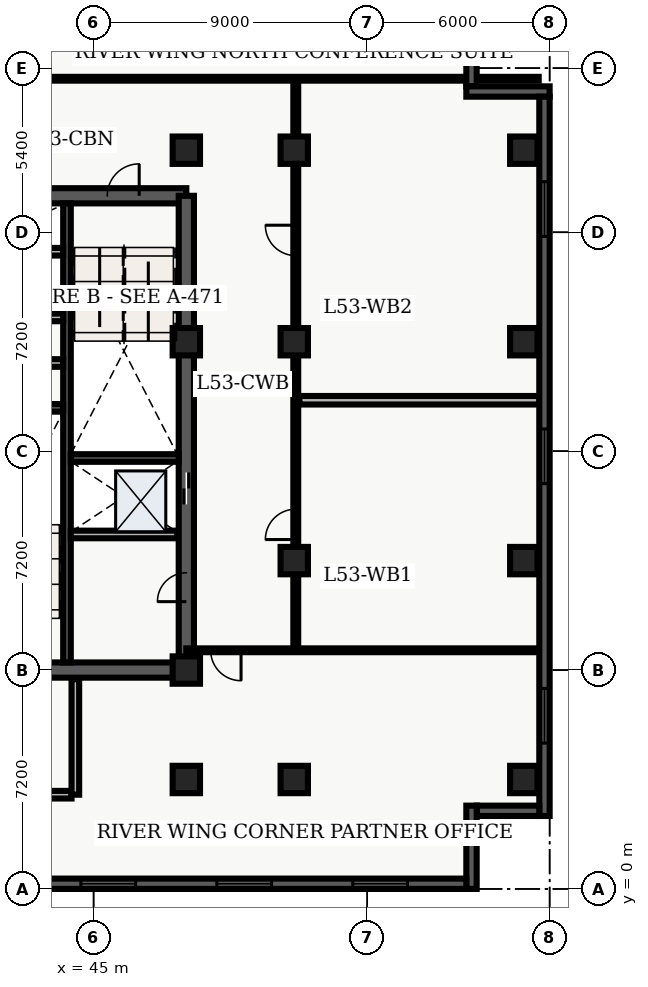
"""IFC4 building model, lengths in metres.
Left out: names, types, materials, properties, quantities, classifications, styles, units other than length and angle.
Written with IfcOpenShell. Run it as: python <this file> out.ifc"""

import sys

from ifc_helpers import new_model, entity, si_unit, converted_unit, direction, frame, origin_with_axes, origin_2d_with_axis, place, context, subcontext, project, spatial, polyline, rectangle, outline, extrude, element, fill, save


model = new_model("IFC4")
c1 = context("Model", 3, precision=1e-05, world=origin_with_axes(), true_north=direction((0.0, 1.0)))
c2 = subcontext(c1, "Body", "Model", "MODEL_VIEW")
j1 = project(units=[si_unit("LENGTHUNIT", "METRE"), converted_unit("PLANEANGLEUNIT", "DEGREE", entity("IfcPlaneAngleMeasure", 0.017), si_unit("PLANEANGLEUNIT", "RADIAN"), dimensions=[0, 0, 0, 0, 0, 0, 0])], contexts=[c1])
p1 = place(None, origin_with_axes())
s1 = spatial("IfcSite", under=j1, at=p1, CompositionType="ELEMENT")
p2 = place(p1, origin_with_axes())
s2 = spatial("IfcBuilding", under=s1, at=p2, CompositionType="ELEMENT")
p3 = place(p2, frame((0.0, 0.0, 216.0), z_axis=(0.0, 0.0, 1.0), x_axis=(1.0, 0.0, 0.0)))
s3 = spatial("IfcBuildingStorey", under=s2, at=p3, CompositionType="ELEMENT", Elevation=216.0)
p4 = place(p3, frame((40.2, 7.2, 0.0), z_axis=(0.0, 0.0, 1.0), x_axis=(1.0, 0.0, 0.0)))
e1 = element("IfcWall", 1, at=p4, inside=s3, PredefinedType="SHEAR", context=c2, shape_type="SweptSolid", body=[
    extrude(outline(polyline([(0.0, -0.25), (7.85, -0.25), (7.85, 0.25), (0.0, 0.25), (0.0, -0.25)])), origin_with_axes(), (0.0, 0.0, 1.0), 3.6),
])
p5 = place(p4, frame((2.175, 0.0, 0.0), z_axis=(0.0, 0.0, 1.0), x_axis=(1.0, 0.0, 0.0)))
e2 = element("IfcOpeningElement", 2, at=p5, cuts=e1, PredefinedType="OPENING", context=c2, shape_type="SweptSolid", body=[
    extrude(rectangle(XDim=1.05, YDim=0.52, at=origin_2d_with_axis()), origin_with_axes(), (0.0, 0.0, 1.0), 2.15),
])
p6 = place(p3, frame((40.2, 22.8, 0.0), z_axis=(0.0, 0.0, 1.0), x_axis=(1.0, 0.0, 0.0)))
e3 = element("IfcWall", 3, at=p6, inside=s3, PredefinedType="SHEAR", context=c2, shape_type="SweptSolid", body=[
    extrude(outline(polyline([(0.0, -0.25), (7.85, -0.25), (7.85, 0.25), (0.0, 0.25), (0.0, -0.25)])), origin_with_axes(), (0.0, 0.0, 1.0), 3.6),
])
p7 = place(p6, frame((5.775, 0.0, 0.0), z_axis=(0.0, 0.0, 1.0), x_axis=(1.0, 0.0, 0.0)))
e4 = element("IfcOpeningElement", 4, at=p7, cuts=e3, PredefinedType="OPENING", context=c2, shape_type="SweptSolid", body=[
    extrude(rectangle(XDim=1.05, YDim=0.52, at=origin_2d_with_axis()), origin_with_axes(), (0.0, 0.0, 1.0), 2.15),
])
p8 = place(p3, frame((48.05, 7.2, 0.0), z_axis=(0.0, 0.0, 1.0), x_axis=(0.0, 1.0, 0.0)))
e5 = element("IfcWall", 5, at=p8, inside=s3, PredefinedType="SHEAR", context=c2, shape_type="SweptSolid", body=[
    extrude(outline(polyline([(0.0, -0.25), (15.6, -0.25), (15.6, 0.25), (0.0, 0.25), (0.0, -0.25)])), origin_with_axes(), (0.0, 0.0, 1.0), 3.6),
])
p9 = place(p8, frame((5.975, 0.0, 0.0), z_axis=(0.0, 0.0, 1.0), x_axis=(1.0, 0.0, 0.0)))
e6 = element("IfcOpeningElement", 6, at=p9, cuts=e5, PredefinedType="OPENING", context=c2, shape_type="SweptSolid", body=[
    extrude(rectangle(XDim=1.05, YDim=0.52, at=origin_2d_with_axis()), origin_with_axes(), (0.0, 0.0, 1.0), 2.15),
])
p10 = place(p8, frame((2.725, 0.0, 0.0), z_axis=(0.0, 0.0, 1.0), x_axis=(1.0, 0.0, 0.0)))
e7 = element("IfcOpeningElement", 7, at=p10, cuts=e5, PredefinedType="OPENING", context=c2, shape_type="SweptSolid", body=[
    extrude(rectangle(XDim=0.95, YDim=0.52, at=origin_2d_with_axis()), origin_with_axes(), (0.0, 0.0, 1.0), 2.15),
])
p11 = place(p3, frame((44.125, 7.45, 0.0), z_axis=(0.0, 0.0, 1.0), x_axis=(0.0, 1.0, 0.0)))
e8 = element("IfcWall", 8, at=p11, inside=s3, PredefinedType="SHEAR", context=c2, shape_type="SweptSolid", body=[
    extrude(outline(polyline([(0.0, -0.125), (15.1, -0.125), (15.1, 0.125), (0.0, 0.125), (0.0, -0.125)])), origin_with_axes(), (0.0, 0.0, 1.0), 3.6),
])
for number, where, z_axis, x_axis in (
    (9, (40.45, 15.825, 0.0), (0.0, 0.0, 1.0), (1.0, 0.0, 0.0)),
    (10, (44.25, 14.175, 0.0), (0.0, 0.0, 1.0), (1.0, 0.0, 0.0)),
):
    element("IfcWall", number, at=place(p3, frame(where, z_axis=z_axis, x_axis=x_axis)), inside=s3, PredefinedType="SHEAR", context=c2, shape_type="SweptSolid", body=[
        extrude(outline(polyline([(0.0, -0.125), (3.55, -0.125), (3.55, 0.125), (0.0, 0.125), (0.0, -0.125)])), origin_with_axes(), (0.0, 0.0, 1.0), 3.6),
    ])
p12 = place(p3, frame((40.5, 17.3, 0.0), z_axis=(0.0, 0.0, 1.0), x_axis=(1.0, 0.0, 0.0)))
e11 = element("IfcWall", 11, at=p12, inside=s3, PredefinedType="SOLIDWALL", context=c2, shape_type="SweptSolid", body=[
    extrude(outline(polyline([(0.0, -0.125), (3.5, -0.125), (3.5, 0.125), (0.0, 0.125), (0.0, -0.125)])), origin_with_axes(), (0.0, 0.0, 1.0), 2.64),
])
p13 = place(p12, frame((2.4, 0.0, 0.0), z_axis=(0.0, 0.0, 1.0), x_axis=(1.0, 0.0, 0.0)))
e12 = element("IfcOpeningElement", 12, at=p13, cuts=e11, PredefinedType="OPENING", context=c2, shape_type="SweptSolid", body=[
    extrude(rectangle(XDim=0.9, YDim=0.27, at=origin_2d_with_axis()), origin_with_axes(), (0.0, 0.0, 1.0), 2.15),
])
p14 = place(p3, frame((40.5, 18.8, 0.0), z_axis=(0.0, 0.0, 1.0), x_axis=(1.0, 0.0, 0.0)))
e13 = element("IfcWall", 13, at=p14, inside=s3, PredefinedType="SOLIDWALL", context=c2, shape_type="SweptSolid", body=[
    extrude(outline(polyline([(0.0, -0.125), (3.5, -0.125), (3.5, 0.125), (0.0, 0.125), (0.0, -0.125)])), origin_with_axes(), (0.0, 0.0, 1.0), 2.64),
])
p15 = place(p3, frame((40.325, 3.1, 0.0), z_axis=(0.0, 0.0, 1.0), x_axis=(1.0, 0.0, 0.0)))
e14 = element("IfcWall", 14, at=p15, inside=s3, PredefinedType="SOLIDWALL", context=c2, shape_type="SweptSolid", body=[
    extrude(outline(polyline([(0.0, -0.125), (3.95, -0.125), (3.95, 0.125), (0.0, 0.125), (0.0, -0.125)])), origin_with_axes(), (0.0, 0.0, 1.0), 2.64),
])
p16 = place(p3, frame((44.4, 3.1, 0.0), z_axis=(0.0, 0.0, 1.0), x_axis=(0.0, 1.0, 0.0)))
e15 = element("IfcWall", 15, at=p16, inside=s3, PredefinedType="SOLIDWALL", context=c2, shape_type="SweptSolid", body=[
    extrude(outline(polyline([(0.0, -0.125), (3.8, -0.125), (3.8, 0.125), (0.0, 0.125), (0.0, -0.125)])), origin_with_axes(), (0.0, 0.0, 1.0), 2.64),
])
for number, where, z_axis, x_axis in (
    (16, (48.05, 3.6, 0.0), (0.0, 0.0, 1.0), (1.0, 0.0, 0.0)),
    (17, (48.05, 7.2, 0.0), (0.0, 0.0, 1.0), (1.0, 0.0, 0.0)),
    (18, (48.05, 18.0, 0.0), (0.0, 0.0, 1.0), (1.0, 0.0, 0.0)),
    (19, (48.05, 24.3, 0.0), (0.0, 0.0, 1.0), (1.0, 0.0, 0.0)),
    (20, (51.6, 3.6, 0.0), (0.0, 0.0, 1.0), (1.0, 0.0, 0.0)),
    (21, (51.6, 10.8, 0.0), (0.0, 0.0, 1.0), (1.0, 0.0, 0.0)),
    (22, (51.6, 18.0, 0.0), (0.0, 0.0, 1.0), (1.0, 0.0, 0.0)),
    (23, (51.6, 24.3, 0.0), (0.0, 0.0, 1.0), (1.0, 0.0, 0.0)),
    (24, (59.15, 3.6, 0.0), (0.0, 0.0, 1.0), (1.0, 0.0, 0.0)),
    (25, (59.15, 10.8, 0.0), (0.0, 0.0, 1.0), (1.0, 0.0, 0.0)),
    (26, (59.15, 18.0, 0.0), (0.0, 0.0, 1.0), (1.0, 0.0, 0.0)),
    (27, (59.15, 24.3, 0.0), (0.0, 0.0, 1.0), (1.0, 0.0, 0.0)),
):
    element("IfcColumn", number, at=place(p3, frame(where, z_axis=z_axis, x_axis=x_axis)), inside=s3, PredefinedType="COLUMN", context=c2, shape_type="SweptSolid", body=[
        extrude(rectangle(XDim=0.9, YDim=0.9, at=origin_2d_with_axis()), origin_with_axes(), (0.0, 0.0, 1.0), 3.9),
    ])
for number, where, z_axis, x_axis in (
    (28, (40.5, 20.96, 0.0), (0.0, 0.0, 1.0), (1.0, 0.0, 0.0)),
    (29, (44.25, 11.66, 0.0), (0.0, 0.0, 1.0), (1.0, 0.0, 0.0)),
):
    element("IfcWall", number, at=place(p3, frame(where, z_axis=z_axis, x_axis=x_axis)), inside=s3, PredefinedType="SOLIDWALL", context=c2, shape_type="SweptSolid", body=[
        extrude(outline(polyline([(0.0, -0.125), (3.5, -0.125), (3.5, 0.125), (0.0, 0.125), (0.0, -0.125)])), origin_with_axes(), (0.0, 0.0, 1.0), 2.64),
    ])
p17 = place(p3, frame((51.65, 7.85, 0.0), z_axis=(0.0, 0.0, 1.0), x_axis=(0.0, 1.0, 0.0)))
e30 = element("IfcWall", 30, at=p17, inside=s3, PredefinedType="PARTITIONING", context=c2, shape_type="SweptSolid", body=[
    extrude(outline(polyline([(0.0, -0.08), (18.8, -0.08), (18.8, 0.08), (0.0, 0.08), (0.0, -0.08)])), origin_with_axes(), (0.0, 0.0, 1.0), 2.64),
])
p18 = place(p17, frame((4.143, 0.0, 0.0), z_axis=(0.0, 0.0, 1.0), x_axis=(1.0, 0.0, 0.0)))
e31 = element("IfcOpeningElement", 31, at=p18, cuts=e30, PredefinedType="OPENING", context=c2, shape_type="SweptSolid", body=[
    extrude(rectangle(XDim=1.0, YDim=0.18, at=origin_2d_with_axis()), origin_with_axes(), (0.0, 0.0, 1.0), 2.15),
])
p19 = place(p17, frame((13.482, 0.0, 0.0), z_axis=(0.0, 0.0, 1.0), x_axis=(1.0, 0.0, 0.0)))
e32 = element("IfcOpeningElement", 32, at=p19, cuts=e30, PredefinedType="OPENING", context=c2, shape_type="SweptSolid", body=[
    extrude(rectangle(XDim=1.0, YDim=0.18, at=origin_2d_with_axis()), origin_with_axes(), (0.0, 0.0, 1.0), 2.15),
])
p20 = place(p3, frame((59.665, 7.85, 0.0), z_axis=(0.0, 0.0, 1.0), x_axis=(-1.0, 0.0, 0.0)))
e33 = element("IfcWall", 33, at=p20, inside=s3, PredefinedType="PARTITIONING", context=c2, shape_type="SweptSolid", body=[
    extrude(outline(polyline([(0.0, -0.062), (11.615, -0.062), (11.615, 0.062), (0.0, 0.062), (0.0, -0.062)])), origin_with_axes(), (0.0, 0.0, 1.0), 2.64),
])
p21 = place(p20, frame((10.315, 0.0, 0.0), z_axis=(0.0, 0.0, 1.0), x_axis=(1.0, 0.0, 0.0)))
e34 = element("IfcOpeningElement", 34, at=p21, cuts=e33, PredefinedType="OPENING", context=c2, shape_type="SweptSolid", body=[
    extrude(rectangle(XDim=1.0, YDim=0.145, at=origin_2d_with_axis()), origin_with_axes(), (0.0, 0.0, 1.0), 2.15),
])
p22 = place(p3, frame((38.735, 26.65, 0.0), z_axis=(0.0, 0.0, 1.0), x_axis=(1.0, 0.0, 0.0)))
e35 = element("IfcWall", 35, at=p22, inside=s3, PredefinedType="PARTITIONING", context=c2, shape_type="SweptSolid", body=[
    extrude(outline(polyline([(0.0, -0.062), (20.905, -0.062), (20.905, 0.062), (0.0, 0.062), (0.0, -0.062)])), origin_with_axes(), (0.0, 0.0, 1.0), 2.64),
])
p23 = place(p22, frame((4.265, 0.0, 0.0), z_axis=(0.0, 0.0, 1.0), x_axis=(1.0, 0.0, 0.0)))
e36 = element("IfcOpeningElement", 36, at=p23, cuts=e35, PredefinedType="OPENING", context=c2, shape_type="SweptSolid", body=[
    extrude(rectangle(XDim=1.0, YDim=0.145, at=origin_2d_with_axis()), origin_with_axes(), (0.0, 0.0, 1.0), 2.15),
])
p24 = place(p3, frame((51.77, 16.075, 0.0), z_axis=(0.0, 0.0, 1.0), x_axis=(1.0, 0.0, 0.0)))
e37 = element("IfcWall", 37, at=p24, inside=s3, PredefinedType="PARTITIONING", context=c2, shape_type="SweptSolid", body=[
    extrude(outline(polyline([(0.0, -0.14), (7.895, -0.14), (7.895, 0.14), (0.0, 0.14), (0.0, -0.14)])), origin_with_axes(), (0.0, 0.0, 1.0), 2.64),
])
p25 = place(p3, frame((57.43, 28.46, 0.0), z_axis=(0.0, 0.0, 1.0), x_axis=(0.0, -1.0, 0.0)))
e38 = element("IfcWall", 38, at=p25, inside=s3, PredefinedType="SOLIDWALL", context=c2, shape_type="SweptSolid", body=[
    extrude(outline(polyline([(0.0, -0.17), (2.06, -0.17), (2.06, 0.17), (0.0, 0.17), (0.0, -0.17)])), origin_with_axes(), (0.0, 0.0, 1.0), 3.6),
])
p26 = place(p3, frame((57.26, 26.23, 0.0), z_axis=(0.0, 0.0, 1.0), x_axis=(1.0, 0.0, 0.0)))
e39 = element("IfcWall", 39, at=p26, inside=s3, PredefinedType="SOLIDWALL", context=c2, shape_type="SweptSolid", body=[
    extrude(outline(polyline([(0.0, -0.17), (2.74, -0.17), (2.74, 0.17), (0.0, 0.17), (0.0, -0.17)])), origin_with_axes(), (0.0, 0.0, 1.0), 3.6),
])
p27 = place(p3, frame((59.83, 26.06, 0.0), z_axis=(0.0, 0.0, 1.0), x_axis=(0.0, -1.0, 0.0)))
e40 = element("IfcWall", 40, at=p27, inside=s3, PredefinedType="SOLIDWALL", context=c2, shape_type="SweptSolid", body=[
    extrude(outline(polyline([(0.0, -0.17), (23.66, -0.17), (23.66, 0.17), (0.0, 0.17), (0.0, -0.17)])), origin_with_axes(), (0.0, 0.0, 1.0), 3.6),
])
p28 = place(p27, frame((3.696, 0.0, 0.45), z_axis=(0.0, 0.0, 1.0), x_axis=(1.0, 0.0, 0.0)))
e41 = element("IfcOpeningElement", 41, at=p28, cuts=e40, PredefinedType="OPENING", context=c2, shape_type="SweptSolid", body=[
    extrude(rectangle(XDim=1.8, YDim=0.36, at=origin_2d_with_axis()), origin_with_axes(), (0.0, 0.0, 1.0), 2.1),
])
p29 = place(p27, frame((11.83, 0.0, 0.45), z_axis=(0.0, 0.0, 1.0), x_axis=(1.0, 0.0, 0.0)))
e42 = element("IfcOpeningElement", 42, at=p29, cuts=e40, PredefinedType="OPENING", context=c2, shape_type="SweptSolid", body=[
    extrude(rectangle(XDim=1.8, YDim=0.36, at=origin_2d_with_axis()), origin_with_axes(), (0.0, 0.0, 1.0), 2.1),
])
p30 = place(p27, frame((20.364, 0.0, 0.45), z_axis=(0.0, 0.0, 1.0), x_axis=(1.0, 0.0, 0.0)))
e43 = element("IfcOpeningElement", 43, at=p30, cuts=e40, PredefinedType="OPENING", context=c2, shape_type="SweptSolid", body=[
    extrude(rectangle(XDim=1.8, YDim=0.36, at=origin_2d_with_axis()), origin_with_axes(), (0.0, 0.0, 1.0), 2.1),
])
p31 = place(p3, frame((59.66, 2.57, 0.0), z_axis=(0.0, 0.0, 1.0), x_axis=(-1.0, 0.0, 0.0)))
e44 = element("IfcWall", 44, at=p31, inside=s3, PredefinedType="SOLIDWALL", context=c2, shape_type="SweptSolid", body=[
    extrude(outline(polyline([(0.0, -0.17), (2.06, -0.17), (2.06, 0.17), (0.0, 0.17), (0.0, -0.17)])), origin_with_axes(), (0.0, 0.0, 1.0), 3.6),
])
p32 = place(p3, frame((57.43, 2.74, 0.0), z_axis=(0.0, 0.0, 1.0), x_axis=(0.0, -1.0, 0.0)))
e45 = element("IfcWall", 45, at=p32, inside=s3, PredefinedType="SOLIDWALL", context=c2, shape_type="SweptSolid", body=[
    extrude(outline(polyline([(0.0, -0.17), (2.74, -0.17), (2.74, 0.17), (0.0, 0.17), (0.0, -0.17)])), origin_with_axes(), (0.0, 0.0, 1.0), 3.6),
])
p33 = place(p3, frame((57.26, 0.17, 0.0), z_axis=(0.0, 0.0, 1.0), x_axis=(-1.0, 0.0, 0.0)))
e46 = element("IfcWall", 46, at=p33, inside=s3, PredefinedType="SOLIDWALL", context=c2, shape_type="SweptSolid", body=[
    extrude(outline(polyline([(0.0, -0.17), (54.86, -0.17), (54.86, 0.17), (0.0, 0.17), (0.0, -0.17)])), origin_with_axes(), (0.0, 0.0, 1.0), 3.6),
])
p34 = place(p33, frame((2.836, 0.0, 0.45), z_axis=(0.0, 0.0, 1.0), x_axis=(1.0, 0.0, 0.0)))
e47 = element("IfcOpeningElement", 47, at=p34, cuts=e46, PredefinedType="OPENING", context=c2, shape_type="SweptSolid", body=[
    extrude(rectangle(XDim=1.8, YDim=0.36, at=origin_2d_with_axis()), origin_with_axes(), (0.0, 0.0, 1.0), 2.1),
])
p35 = place(p33, frame((7.307, 0.0, 0.45), z_axis=(0.0, 0.0, 1.0), x_axis=(1.0, 0.0, 0.0)))
e48 = element("IfcOpeningElement", 48, at=p35, cuts=e46, PredefinedType="OPENING", context=c2, shape_type="SweptSolid", body=[
    extrude(rectangle(XDim=1.8, YDim=0.36, at=origin_2d_with_axis()), origin_with_axes(), (0.0, 0.0, 1.0), 2.1),
])
p36 = place(p33, frame((11.779, 0.0, 0.45), z_axis=(0.0, 0.0, 1.0), x_axis=(1.0, 0.0, 0.0)))
e49 = element("IfcOpeningElement", 49, at=p36, cuts=e46, PredefinedType="OPENING", context=c2, shape_type="SweptSolid", body=[
    extrude(rectangle(XDim=1.8, YDim=0.36, at=origin_2d_with_axis()), origin_with_axes(), (0.0, 0.0, 1.0), 2.1),
])
p37 = place(p33, frame((16.251, 0.0, 0.45), z_axis=(0.0, 0.0, 1.0), x_axis=(1.0, 0.0, 0.0)))
e50 = element("IfcOpeningElement", 50, at=p37, cuts=e46, PredefinedType="OPENING", context=c2, shape_type="SweptSolid", body=[
    extrude(rectangle(XDim=1.8, YDim=0.36, at=origin_2d_with_axis()), origin_with_axes(), (0.0, 0.0, 1.0), 2.1),
])
p38 = place(p33, frame((20.723, 0.0, 0.45), z_axis=(0.0, 0.0, 1.0), x_axis=(1.0, 0.0, 0.0)))
e51 = element("IfcOpeningElement", 51, at=p38, cuts=e46, PredefinedType="OPENING", context=c2, shape_type="SweptSolid", body=[
    extrude(rectangle(XDim=1.8, YDim=0.36, at=origin_2d_with_axis()), origin_with_axes(), (0.0, 0.0, 1.0), 2.1),
])
p39 = place(p33, frame((25.194, 0.0, 0.45), z_axis=(0.0, 0.0, 1.0), x_axis=(1.0, 0.0, 0.0)))
e52 = element("IfcOpeningElement", 52, at=p39, cuts=e46, PredefinedType="OPENING", context=c2, shape_type="SweptSolid", body=[
    extrude(rectangle(XDim=1.8, YDim=0.36, at=origin_2d_with_axis()), origin_with_axes(), (0.0, 0.0, 1.0), 2.1),
])
p40 = place(p33, frame((29.666, 0.0, 0.45), z_axis=(0.0, 0.0, 1.0), x_axis=(1.0, 0.0, 0.0)))
e53 = element("IfcOpeningElement", 53, at=p40, cuts=e46, PredefinedType="OPENING", context=c2, shape_type="SweptSolid", body=[
    extrude(rectangle(XDim=1.8, YDim=0.36, at=origin_2d_with_axis()), origin_with_axes(), (0.0, 0.0, 1.0), 2.1),
])
p41 = place(p33, frame((34.138, 0.0, 0.45), z_axis=(0.0, 0.0, 1.0), x_axis=(1.0, 0.0, 0.0)))
e54 = element("IfcOpeningElement", 54, at=p41, cuts=e46, PredefinedType="OPENING", context=c2, shape_type="SweptSolid", body=[
    extrude(rectangle(XDim=1.8, YDim=0.36, at=origin_2d_with_axis()), origin_with_axes(), (0.0, 0.0, 1.0), 2.1),
])
p42 = place(p33, frame((38.159, 0.0, 0.45), z_axis=(0.0, 0.0, 1.0), x_axis=(1.0, 0.0, 0.0)))
e55 = element("IfcOpeningElement", 55, at=p42, cuts=e46, PredefinedType="OPENING", context=c2, shape_type="SweptSolid", body=[
    extrude(rectangle(XDim=1.8, YDim=0.36, at=origin_2d_with_axis()), origin_with_axes(), (0.0, 0.0, 1.0), 2.1),
])
p43 = place(p33, frame((43.081, 0.0, 0.45), z_axis=(0.0, 0.0, 1.0), x_axis=(1.0, 0.0, 0.0)))
e56 = element("IfcOpeningElement", 56, at=p43, cuts=e46, PredefinedType="OPENING", context=c2, shape_type="SweptSolid", body=[
    extrude(rectangle(XDim=1.8, YDim=0.36, at=origin_2d_with_axis()), origin_with_axes(), (0.0, 0.0, 1.0), 2.1),
])
p44 = place(p33, frame((47.553, 0.0, 0.45), z_axis=(0.0, 0.0, 1.0), x_axis=(1.0, 0.0, 0.0)))
e57 = element("IfcOpeningElement", 57, at=p44, cuts=e46, PredefinedType="OPENING", context=c2, shape_type="SweptSolid", body=[
    extrude(rectangle(XDim=1.8, YDim=0.36, at=origin_2d_with_axis()), origin_with_axes(), (0.0, 0.0, 1.0), 2.1),
])
p45 = place(p33, frame((52.024, 0.0, 0.45), z_axis=(0.0, 0.0, 1.0), x_axis=(1.0, 0.0, 0.0)))
e58 = element("IfcOpeningElement", 58, at=p45, cuts=e46, PredefinedType="OPENING", context=c2, shape_type="SweptSolid", body=[
    extrude(rectangle(XDim=1.8, YDim=0.36, at=origin_2d_with_axis()), origin_with_axes(), (0.0, 0.0, 1.0), 2.1),
])
p46 = place(p8, frame((5.975, 0.0, 0.0), z_axis=(0.0, 0.0, 1.0), x_axis=(1.0, 0.0, 0.0)))
e59 = element("IfcDoor", 59, at=p46, inside=s3, OperationType="SLIDING_TO_LEFT", PredefinedType="DOOR", context=c2, shape_type="SweptSolid", body=[
    extrude(rectangle(XDim=1.05, YDim=0.09, at=origin_2d_with_axis()), origin_with_axes(), (0.0, 0.0, 1.0), 2.15),
])
fill(e6, e59)
p47 = place(p6, frame((5.775, 0.0, 0.0), z_axis=(0.0, 0.0, 1.0), x_axis=(1.0, 0.0, 0.0)))
e60 = element("IfcDoor", 60, at=p47, inside=s3, OperationType="SINGLE_SWING_RIGHT", PredefinedType="DOOR", context=c2, shape_type="SweptSolid", body=[
    extrude(rectangle(XDim=1.05, YDim=0.09, at=origin_2d_with_axis()), origin_with_axes(), (0.0, 0.0, 1.0), 2.15),
])
fill(e4, e60)
p48 = place(p8, frame((2.725, 0.0, 0.0), z_axis=(0.0, 0.0, 1.0), x_axis=(1.0, 0.0, 0.0)))
e61 = element("IfcDoor", 61, at=p48, inside=s3, OperationType="SINGLE_SWING_LEFT", PredefinedType="DOOR", context=c2, shape_type="SweptSolid", body=[
    extrude(rectangle(XDim=0.95, YDim=0.09, at=origin_2d_with_axis()), origin_with_axes(), (0.0, 0.0, 1.0), 2.15),
])
fill(e7, e61)
p49 = place(p20, frame((10.315, 0.0, 0.0), z_axis=(0.0, 0.0, 1.0), x_axis=(1.0, 0.0, 0.0)))
e62 = element("IfcDoor", 62, at=p49, inside=s3, OperationType="SINGLE_SWING_LEFT", PredefinedType="DOOR", context=c2, shape_type="SweptSolid", body=[
    extrude(rectangle(XDim=1.0, YDim=0.075, at=origin_2d_with_axis()), origin_with_axes(), (0.0, 0.0, 1.0), 2.15),
])
fill(e34, e62)
p50 = place(p17, frame((4.143, 0.0, 0.0), z_axis=(0.0, 0.0, 1.0), x_axis=(1.0, 0.0, 0.0)))
e63 = element("IfcDoor", 63, at=p50, inside=s3, OperationType="SINGLE_SWING_LEFT", PredefinedType="DOOR", context=c2, shape_type="SweptSolid", body=[
    extrude(rectangle(XDim=1.0, YDim=0.09, at=origin_2d_with_axis()), origin_with_axes(), (0.0, 0.0, 1.0), 2.15),
])
fill(e31, e63)
p51 = place(p17, frame((13.482, 0.0, 0.0), z_axis=(0.0, 0.0, 1.0), x_axis=(1.0, 0.0, 0.0)))
e64 = element("IfcDoor", 64, at=p51, inside=s3, OperationType="SINGLE_SWING_RIGHT", PredefinedType="DOOR", context=c2, shape_type="SweptSolid", body=[
    extrude(rectangle(XDim=1.0, YDim=0.09, at=origin_2d_with_axis()), origin_with_axes(), (0.0, 0.0, 1.0), 2.15),
])
fill(e32, e64)
p52 = place(p27, frame((3.696, 0.0, 0.45), z_axis=(0.0, 0.0, 1.0), x_axis=(1.0, 0.0, 0.0)))
e65 = element("IfcWindow", 65, at=p52, inside=s3, PredefinedType="WINDOW", context=c2, shape_type="SweptSolid", body=[
    extrude(rectangle(XDim=1.8, YDim=0.09, at=origin_2d_with_axis()), origin_with_axes(), (0.0, 0.0, 1.0), 2.1),
])
fill(e41, e65)
p53 = place(p27, frame((11.83, 0.0, 0.45), z_axis=(0.0, 0.0, 1.0), x_axis=(1.0, 0.0, 0.0)))
e66 = element("IfcWindow", 66, at=p53, inside=s3, PredefinedType="WINDOW", context=c2, shape_type="SweptSolid", body=[
    extrude(rectangle(XDim=1.8, YDim=0.09, at=origin_2d_with_axis()), origin_with_axes(), (0.0, 0.0, 1.0), 2.1),
])
fill(e42, e66)
p54 = place(p27, frame((20.364, 0.0, 0.45), z_axis=(0.0, 0.0, 1.0), x_axis=(1.0, 0.0, 0.0)))
e67 = element("IfcWindow", 67, at=p54, inside=s3, PredefinedType="WINDOW", context=c2, shape_type="SweptSolid", body=[
    extrude(rectangle(XDim=1.8, YDim=0.09, at=origin_2d_with_axis()), origin_with_axes(), (0.0, 0.0, 1.0), 2.1),
])
fill(e43, e67)
p55 = place(p33, frame((2.836, 0.0, 0.45), z_axis=(0.0, 0.0, 1.0), x_axis=(1.0, 0.0, 0.0)))
e68 = element("IfcWindow", 68, at=p55, inside=s3, PredefinedType="WINDOW", context=c2, shape_type="SweptSolid", body=[
    extrude(rectangle(XDim=1.8, YDim=0.09, at=origin_2d_with_axis()), origin_with_axes(), (0.0, 0.0, 1.0), 2.1),
])
fill(e47, e68)
p56 = place(p33, frame((7.307, 0.0, 0.45), z_axis=(0.0, 0.0, 1.0), x_axis=(1.0, 0.0, 0.0)))
e69 = element("IfcWindow", 69, at=p56, inside=s3, PredefinedType="WINDOW", context=c2, shape_type="SweptSolid", body=[
    extrude(rectangle(XDim=1.8, YDim=0.09, at=origin_2d_with_axis()), origin_with_axes(), (0.0, 0.0, 1.0), 2.1),
])
fill(e48, e69)
p57 = place(p33, frame((11.779, 0.0, 0.45), z_axis=(0.0, 0.0, 1.0), x_axis=(1.0, 0.0, 0.0)))
e70 = element("IfcWindow", 70, at=p57, inside=s3, PredefinedType="WINDOW", context=c2, shape_type="SweptSolid", body=[
    extrude(rectangle(XDim=1.8, YDim=0.09, at=origin_2d_with_axis()), origin_with_axes(), (0.0, 0.0, 1.0), 2.1),
])
fill(e49, e70)
save(model, sys.argv[1])
